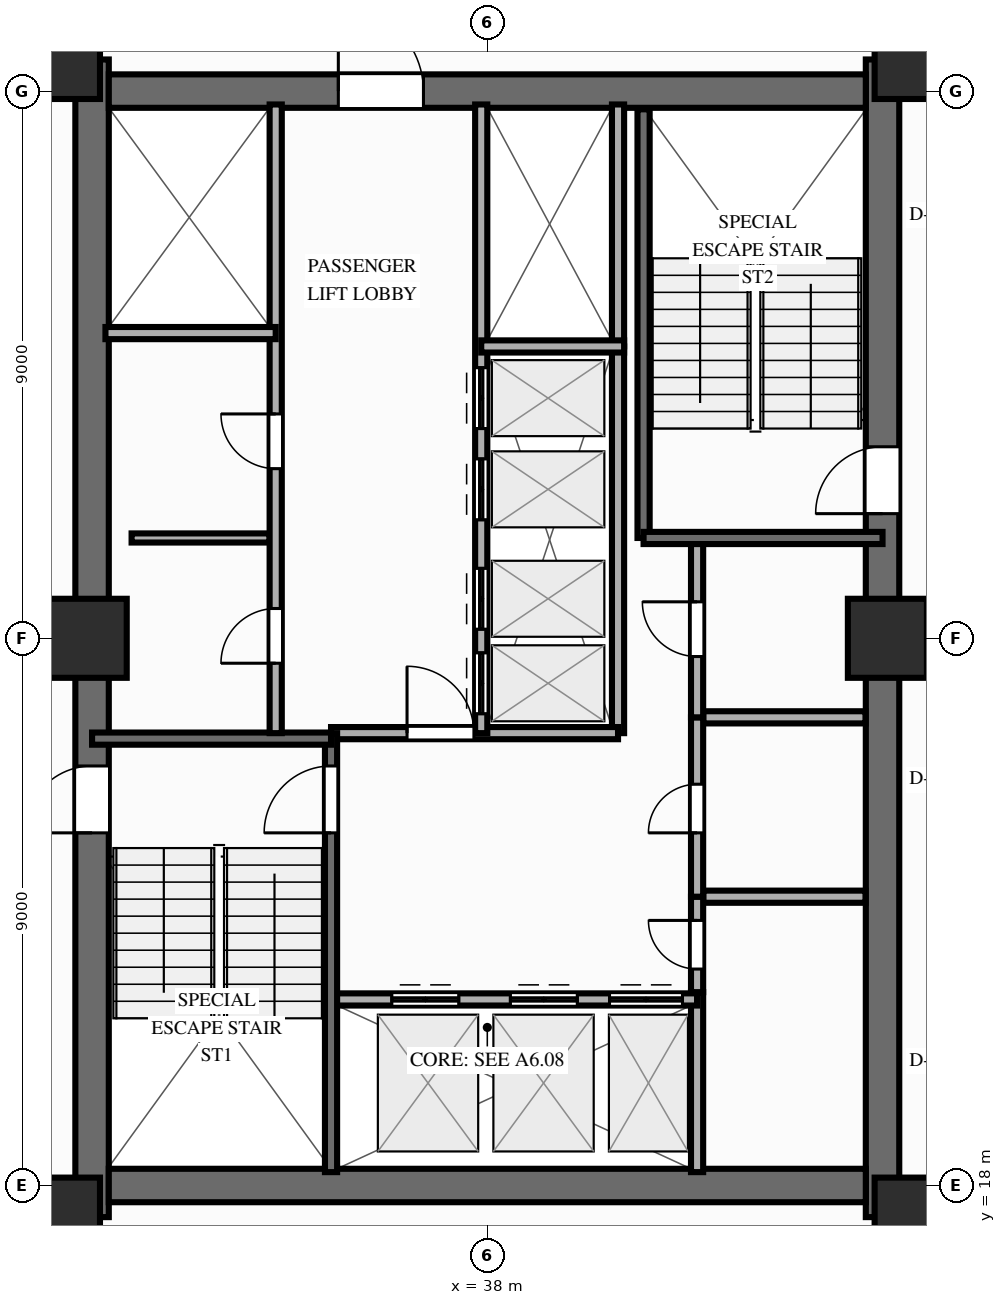
"""IFC4 building model, lengths in metres.
Left out: names, types, materials, properties, quantities, classifications, styles, units other than length and angle.
Written with IfcOpenShell. Run it as: python <this file> out.ifc"""

import sys

from ifc_helpers import new_model, si_unit, direction, frame, frame_2d, origin, origin_2d, place, context, subcontext, project, spatial, rectangle, extrude, source, transform, mapped, element, fill, save


model = new_model("IFC4")
c1 = context("Model", 3, precision=1e-05, world=origin(), true_north=direction((0.0, 1.0)))
c2 = subcontext(c1, "Body", "Model", "MODEL_VIEW")
j1 = project(units=[si_unit("LENGTHUNIT", "METRE"), si_unit("PLANEANGLEUNIT", "RADIAN")], contexts=[c1])
p1 = place(None, origin())
s1 = spatial("IfcSite", under=j1, at=p1, CompositionType="ELEMENT")
p2 = place(p1, origin())
s2 = spatial("IfcBuilding", under=s1, at=p2, CompositionType="ELEMENT")
p3 = place(p2, frame((0.0, 0.0, 122.85)))
s3 = spatial("IfcBuildingStorey", under=s2, at=p3, CompositionType="ELEMENT", Elevation=122.85)
p4 = place(p3, frame((31.5, 17.48, 0.0), z_axis=(0.0, 0.0, 1.0), x_axis=(0.0, 1.0, 0.0)))
e1 = element("IfcWall", 1, at=p4, inside=s3, PredefinedType="SHEAR", context=c2, shape_type="SweptSolid", body=[
    extrude(rectangle(XDim=19.04, YDim=0.55, at=frame_2d((9.52, 0.0))), origin(), (0.0, 0.0, 1.0), 3.9),
])
p5 = place(p4, frame((6.32, 0.0, 0.0)))
e2 = element("IfcOpeningElement", 2, at=p5, cuts=e1, PredefinedType="OPENING", context=c2, shape_type="SweptSolid", body=[
    extrude(rectangle(XDim=1.1, YDim=2.15, at=frame_2d((0.55, 1.075))), frame((0.0, 0.287, 0.0), z_axis=(0.0, -1.0, 0.0), x_axis=(1.0, 0.0, 0.0)), (0.0, 0.0, 1.0), 0.574),
])
p6 = place(p3, frame((44.5, 17.48, 0.0), z_axis=(0.0, 0.0, 1.0), x_axis=(0.0, 1.0, 0.0)))
e3 = element("IfcWall", 3, at=p6, inside=s3, PredefinedType="SHEAR", context=c2, shape_type="SweptSolid", body=[
    extrude(rectangle(XDim=19.04, YDim=0.55, at=frame_2d((9.52, 0.0))), origin(), (0.0, 0.0, 1.0), 3.9),
])
p7 = place(p6, frame((12.67, 0.0, 0.0), z_axis=(0.0, 0.0, 1.0), x_axis=(-1.0, 0.0, 0.0)))
e4 = element("IfcOpeningElement", 4, at=p7, cuts=e3, PredefinedType="OPENING", context=c2, shape_type="SweptSolid", body=[
    extrude(rectangle(XDim=1.1, YDim=2.15, at=frame_2d((0.55, 1.075))), frame((0.0, 0.287, 0.0), z_axis=(0.0, -1.0, 0.0), x_axis=(1.0, 0.0, 0.0)), (0.0, 0.0, 1.0), 0.574),
])
p8 = place(p3, frame((31.775, 18.0, 0.0), z_axis=(0.0, 0.0, 1.0), x_axis=(1.0, 0.0, 0.0)))
e5 = element("IfcWall", 5, at=p8, inside=s3, PredefinedType="SHEAR", context=c2, shape_type="SweptSolid", body=[
    extrude(rectangle(XDim=12.45, YDim=0.55, at=frame_2d((6.225, 0.0))), origin(), (0.0, 0.0, 1.0), 3.9),
])
p9 = place(p3, frame((31.775, 36.0, 0.0), z_axis=(0.0, 0.0, 1.0), x_axis=(1.0, 0.0, 0.0)))
e6 = element("IfcWall", 6, at=p9, inside=s3, PredefinedType="SHEAR", context=c2, shape_type="SweptSolid", body=[
    extrude(rectangle(XDim=12.45, YDim=0.55, at=frame_2d((6.225, 0.0))), origin(), (0.0, 0.0, 1.0), 3.9),
])
p10 = place(p9, frame((5.175, 0.0, 0.0), z_axis=(0.0, 0.0, 1.0), x_axis=(-1.0, 0.0, 0.0)))
e7 = element("IfcOpeningElement", 7, at=p10, cuts=e6, PredefinedType="OPENING", context=c2, shape_type="SweptSolid", body=[
    extrude(rectangle(XDim=1.4, YDim=2.15, at=frame_2d((0.7, 1.075))), frame((0.0, 0.287, 0.0), z_axis=(0.0, -1.0, 0.0), x_axis=(1.0, 0.0, 0.0)), (0.0, 0.0, 1.0), 0.574),
])
m1 = source(origin(), c2, "Body", "SweptSolid", [
    extrude(rectangle(XDim=1.3, YDim=1.3, at=origin_2d()), origin(), (0.0, 0.0, 1.0), 3.9),
])
for number, where, z_axis, x_axis in (
    (8, (30.98, 17.48, 0.0), (0.0, 0.0, 1.0), (1.0, 0.0, 0.0)),
    (9, (45.02, 17.48, 0.0), (0.0, 0.0, 1.0), (1.0, 0.0, 0.0)),
    (10, (30.98, 36.52, 0.0), (0.0, 0.0, 1.0), (1.0, 0.0, 0.0)),
    (11, (45.02, 36.52, 0.0), (0.0, 0.0, 1.0), (1.0, 0.0, 0.0)),
    (12, (31.42, 27.0, 0.0), (0.0, 0.0, 1.0), (1.0, 0.0, 0.0)),
    (13, (44.58, 27.0, 0.0), (0.0, 0.0, 1.0), (1.0, 0.0, 0.0)),
):
    element("IfcColumn", number, at=place(p3, frame(where, z_axis=z_axis, x_axis=x_axis)), inside=s3, PredefinedType="COLUMN", context=c2, shape_type="MappedRepresentation", body=[
        mapped(m1, transform((0.0, 0.0, 0.0), scale=1.0)),
    ])
p11 = place(p3, frame((32.15, 28.65, 0.0), z_axis=(0.0, 0.0, 1.0), x_axis=(1.0, 0.0, 0.0)))
e14 = element("IfcWall", 14, at=p11, inside=s3, PredefinedType="PARTITIONING", context=c2, shape_type="SweptSolid", body=[
    extrude(rectangle(XDim=2.27, YDim=0.15, at=frame_2d((1.135, 0.0))), origin(), (0.0, 0.0, 1.0), 3.04),
])
p12 = place(p3, frame((41.55, 22.75, 0.0), z_axis=(0.0, 0.0, 1.0), x_axis=(1.0, 0.0, 0.0)))
e15 = element("IfcWall", 15, at=p12, inside=s3, PredefinedType="PARTITIONING", context=c2, shape_type="SweptSolid", body=[
    extrude(rectangle(XDim=2.67, YDim=0.2, at=frame_2d((1.335, 0.0))), origin(), (0.0, 0.0, 1.0), 3.56),
])
p13 = place(p3, frame((41.55, 25.7, 0.0), z_axis=(0.0, 0.0, 1.0), x_axis=(1.0, 0.0, 0.0)))
e16 = element("IfcWall", 16, at=p13, inside=s3, PredefinedType="PARTITIONING", context=c2, shape_type="SweptSolid", body=[
    extrude(rectangle(XDim=2.67, YDim=0.2, at=frame_2d((1.335, 0.0))), origin(), (0.0, 0.0, 1.0), 3.04),
])
p14 = place(p3, frame((41.45, 18.22, 0.0), z_axis=(0.0, 0.0, 1.0), x_axis=(0.0, 1.0, 0.0)))
e17 = element("IfcWall", 17, at=p14, inside=s3, PredefinedType="PARTITIONING", context=c2, shape_type="SweptSolid", body=[
    extrude(rectangle(XDim=2.96, YDim=0.2, at=frame_2d((1.48, 0.0))), origin(), (0.0, 0.0, 1.0), 3.56),
])
p15 = place(p3, frame((41.45, 21.18, 0.0), z_axis=(0.0, 0.0, 1.0), x_axis=(0.0, 1.0, 0.0)))
e18 = element("IfcWall", 18, at=p15, inside=s3, PredefinedType="PARTITIONING", context=c2, shape_type="SweptSolid", body=[
    extrude(rectangle(XDim=1.57, YDim=0.2, at=frame_2d((0.785, 0.0))), origin(), (0.0, 0.0, 1.0), 3.56),
])
p16 = place(p15, frame((0.38, 0.0, 0.0)))
e19 = element("IfcOpeningElement", 19, at=p16, cuts=e18, PredefinedType="OPENING", context=c2, shape_type="SweptSolid", body=[
    extrude(rectangle(XDim=0.8, YDim=2.05, at=frame_2d((0.4, 1.025))), frame((0.0, 0.112, 0.0), z_axis=(0.0, -1.0, 0.0), x_axis=(1.0, 0.0, 0.0)), (0.0, 0.0, 1.0), 0.224),
])
p17 = place(p3, frame((41.45, 22.75, 0.0), z_axis=(0.0, 0.0, 1.0), x_axis=(0.0, 1.0, 0.0)))
e20 = element("IfcWall", 20, at=p17, inside=s3, PredefinedType="PARTITIONING", context=c2, shape_type="SweptSolid", body=[
    extrude(rectangle(XDim=2.95, YDim=0.2, at=frame_2d((1.475, 0.0))), origin(), (0.0, 0.0, 1.0), 3.56),
])
p18 = place(p17, frame((1.05, 0.0, 0.0)))
e21 = element("IfcOpeningElement", 21, at=p18, cuts=e20, PredefinedType="OPENING", context=c2, shape_type="SweptSolid", body=[
    extrude(rectangle(XDim=0.8, YDim=2.05, at=frame_2d((0.4, 1.025))), frame((0.0, 0.112, 0.0), z_axis=(0.0, -1.0, 0.0), x_axis=(1.0, 0.0, 0.0)), (0.0, 0.0, 1.0), 0.224),
])
p19 = place(p3, frame((41.45, 25.7, 0.0), z_axis=(0.0, 0.0, 1.0), x_axis=(0.0, 1.0, 0.0)))
e22 = element("IfcWall", 22, at=p19, inside=s3, PredefinedType="PARTITIONING", context=c2, shape_type="SweptSolid", body=[
    extrude(rectangle(XDim=2.9, YDim=0.2, at=frame_2d((1.45, 0.0))), origin(), (0.0, 0.0, 1.0), 3.56),
])
p20 = place(p19, frame((1.0, 0.0, 0.0)))
e23 = element("IfcOpeningElement", 23, at=p20, cuts=e22, PredefinedType="OPENING", context=c2, shape_type="SweptSolid", body=[
    extrude(rectangle(XDim=0.9, YDim=2.1, at=frame_2d((0.45, 1.05))), frame((0.0, 0.112, 0.0), z_axis=(0.0, -1.0, 0.0), x_axis=(1.0, 0.0, 0.0)), (0.0, 0.0, 1.0), 0.224),
])
p21 = place(p3, frame((40.15, 25.44, 0.0), z_axis=(0.0, 0.0, 1.0), x_axis=(0.0, 1.0, 0.0)))
e24 = element("IfcWall", 24, at=p21, inside=s3, PredefinedType="PARTITIONING", context=c2, shape_type="SweptSolid", body=[
    extrude(rectangle(XDim=6.36, YDim=0.2, at=frame_2d((3.18, 0.0))), origin(), (0.0, 0.0, 1.0), 3.56),
])
p22 = place(p3, frame((40.15, 31.8, 0.0), z_axis=(0.0, 0.0, 1.0), x_axis=(0.0, 1.0, 0.0)))
e25 = element("IfcWall", 25, at=p22, inside=s3, PredefinedType="PARTITIONING", context=c2, shape_type="SweptSolid", body=[
    extrude(rectangle(XDim=3.98, YDim=0.2, at=frame_2d((1.99, 0.0))), origin(), (0.0, 0.0, 1.0), 3.56),
])
p23 = place(p3, frame((35.43, 21.06, 0.0), z_axis=(0.0, 0.0, 1.0), x_axis=(1.0, 0.0, 0.0)))
e26 = element("IfcWall", 26, at=p23, inside=s3, PredefinedType="PARTITIONING", context=c2, shape_type="SweptSolid", body=[
    extrude(rectangle(XDim=6.02, YDim=0.2, at=frame_2d((3.01, 0.0))), origin(), (0.0, 0.0, 1.0), 3.56),
])
p24 = place(p23, frame((1.0, 0.0, 0.0)))
e27 = element("IfcOpeningElement", 27, at=p24, cuts=e26, PredefinedType="OPENING", context=c2, shape_type="SweptSolid", body=[
    extrude(rectangle(XDim=1.1, YDim=2.15, at=frame_2d((0.55, 1.075))), frame((0.0, 0.112, 0.0), z_axis=(0.0, -1.0, 0.0), x_axis=(1.0, 0.0, 0.0)), (0.0, 0.0, 1.0), 0.224),
])
p25 = place(p23, frame((2.95, 0.0, 0.0)))
e28 = element("IfcOpeningElement", 28, at=p25, cuts=e26, PredefinedType="OPENING", context=c2, shape_type="SweptSolid", body=[
    extrude(rectangle(XDim=1.1, YDim=2.15, at=frame_2d((0.55, 1.075))), frame((0.0, 0.112, 0.0), z_axis=(0.0, -1.0, 0.0), x_axis=(1.0, 0.0, 0.0)), (0.0, 0.0, 1.0), 0.224),
])
p26 = place(p23, frame((4.58, 0.0, 0.0)))
e29 = element("IfcOpeningElement", 29, at=p26, cuts=e26, PredefinedType="OPENING", context=c2, shape_type="SweptSolid", body=[
    extrude(rectangle(XDim=1.2, YDim=2.15, at=frame_2d((0.6, 1.075))), frame((0.0, 0.112, 0.0), z_axis=(0.0, -1.0, 0.0), x_axis=(1.0, 0.0, 0.0)), (0.0, 0.0, 1.0), 0.224),
])
p27 = place(p3, frame((35.43, 25.44, 0.0), z_axis=(0.0, 0.0, 1.0), x_axis=(1.0, 0.0, 0.0)))
e30 = element("IfcWall", 30, at=p27, inside=s3, PredefinedType="PARTITIONING", context=c2, shape_type="SweptSolid", body=[
    extrude(rectangle(XDim=4.72, YDim=0.2, at=frame_2d((2.36, 0.0))), origin(), (0.0, 0.0, 1.0), 3.56),
])
p28 = place(p27, frame((1.25, 0.0, 0.0)))
e31 = element("IfcOpeningElement", 31, at=p28, cuts=e30, PredefinedType="OPENING", context=c2, shape_type="SweptSolid", body=[
    extrude(rectangle(XDim=1.1, YDim=2.15, at=frame_2d((0.55, 1.075))), frame((0.0, 0.112, 0.0), z_axis=(0.0, -1.0, 0.0), x_axis=(1.0, 0.0, 0.0)), (0.0, 0.0, 1.0), 0.224),
])
p29 = place(p3, frame((35.43, 18.22, 0.0), z_axis=(0.0, 0.0, 1.0), x_axis=(0.0, 1.0, 0.0)))
e32 = element("IfcWall", 32, at=p29, inside=s3, PredefinedType="SOLIDWALL", context=c2, shape_type="SweptSolid", body=[
    extrude(rectangle(XDim=7.22, YDim=0.2, at=frame_2d((3.61, 0.0))), origin(), (0.0, 0.0, 1.0), 3.69),
])
p30 = place(p29, frame((6.68, 0.0, 0.0), z_axis=(0.0, 0.0, 1.0), x_axis=(-1.0, 0.0, 0.0)))
e33 = element("IfcOpeningElement", 33, at=p30, cuts=e32, PredefinedType="OPENING", context=c2, shape_type="SweptSolid", body=[
    extrude(rectangle(XDim=1.1, YDim=2.15, at=frame_2d((0.55, 1.075))), frame((0.0, 0.112, 0.0), z_axis=(0.0, -1.0, 0.0), x_axis=(1.0, 0.0, 0.0)), (0.0, 0.0, 1.0), 0.224),
])
p31 = place(p3, frame((31.5, 25.35, 0.0), z_axis=(0.0, 0.0, 1.0), x_axis=(1.0, 0.0, 0.0)))
e34 = element("IfcWall", 34, at=p31, inside=s3, PredefinedType="SOLIDWALL", context=c2, shape_type="SweptSolid", body=[
    extrude(rectangle(XDim=3.93, YDim=0.2, at=frame_2d((1.965, 0.0))), origin(), (0.0, 0.0, 1.0), 3.69),
])
p32 = place(p3, frame((40.57, 28.65, 0.0), z_axis=(0.0, 0.0, 1.0), x_axis=(0.0, 1.0, 0.0)))
e35 = element("IfcWall", 35, at=p32, inside=s3, PredefinedType="SOLIDWALL", context=c2, shape_type="SweptSolid", body=[
    extrude(rectangle(XDim=7.05, YDim=0.2, at=frame_2d((3.525, 0.0))), origin(), (0.0, 0.0, 1.0), 3.69),
])
p33 = place(p3, frame((40.57, 28.65, 0.0), z_axis=(0.0, 0.0, 1.0), x_axis=(1.0, 0.0, 0.0)))
e36 = element("IfcWall", 36, at=p33, inside=s3, PredefinedType="SOLIDWALL", context=c2, shape_type="SweptSolid", body=[
    extrude(rectangle(XDim=3.93, YDim=0.2, at=frame_2d((1.965, 0.0))), origin(), (0.0, 0.0, 1.0), 3.69),
])
p34 = place(p3, frame((34.52, 25.44, 0.0), z_axis=(0.0, 0.0, 1.0), x_axis=(0.0, 1.0, 0.0)))
e37 = element("IfcWall", 37, at=p34, inside=s3, PredefinedType="PARTITIONING", context=c2, shape_type="SweptSolid", body=[
    extrude(rectangle(XDim=10.34, YDim=0.2, at=frame_2d((5.17, 0.0))), origin(), (0.0, 0.0, 1.0), 3.56),
])
p35 = place(p34, frame((1.15, 0.0, 0.0)))
e38 = element("IfcOpeningElement", 38, at=p35, cuts=e37, PredefinedType="OPENING", context=c2, shape_type="SweptSolid", body=[
    extrude(rectangle(XDim=0.9, YDim=2.1, at=frame_2d((0.45, 1.05))), frame((0.0, 0.112, 0.0), z_axis=(0.0, -1.0, 0.0), x_axis=(1.0, 0.0, 0.0)), (0.0, 0.0, 1.0), 0.224),
])
p36 = place(p34, frame((4.35, 0.0, 0.0)))
e39 = element("IfcOpeningElement", 39, at=p36, cuts=e37, PredefinedType="OPENING", context=c2, shape_type="SweptSolid", body=[
    extrude(rectangle(XDim=0.9, YDim=2.1, at=frame_2d((0.45, 1.05))), frame((0.0, 0.112, 0.0), z_axis=(0.0, -1.0, 0.0), x_axis=(1.0, 0.0, 0.0)), (0.0, 0.0, 1.0), 0.224),
])
p37 = place(p3, frame((31.72, 32.02, 0.0), z_axis=(0.0, 0.0, 1.0), x_axis=(1.0, 0.0, 0.0)))
e40 = element("IfcWall", 40, at=p37, inside=s3, PredefinedType="PARTITIONING", context=c2, shape_type="SweptSolid", body=[
    extrude(rectangle(XDim=2.8, YDim=0.2, at=frame_2d((1.4, 0.0))), origin(), (0.0, 0.0, 1.0), 3.56),
])
p38 = place(p3, frame((37.9, 25.44, 0.0), z_axis=(0.0, 0.0, 1.0), x_axis=(0.0, 1.0, 0.0)))
e41 = element("IfcWall", 41, at=p38, inside=s3, PredefinedType="PARTITIONING", context=c2, shape_type="SweptSolid", body=[
    extrude(rectangle(XDim=10.34, YDim=0.2, at=frame_2d((5.17, 0.0))), origin(), (0.0, 0.0, 1.0), 3.56),
])
p39 = place(p38, frame((0.32, 0.0, 0.0)))
e42 = element("IfcOpeningElement", 42, at=p39, cuts=e41, PredefinedType="OPENING", context=c2, shape_type="SweptSolid", body=[
    extrude(rectangle(XDim=1.0, YDim=2.15, at=frame_2d((0.5, 1.075))), frame((0.0, 0.112, 0.0), z_axis=(0.0, -1.0, 0.0), x_axis=(1.0, 0.0, 0.0)), (0.0, 0.0, 1.0), 0.224),
])
p40 = place(p38, frame((1.71, 0.0, 0.0)))
e43 = element("IfcOpeningElement", 43, at=p40, cuts=e41, PredefinedType="OPENING", context=c2, shape_type="SweptSolid", body=[
    extrude(rectangle(XDim=1.0, YDim=2.15, at=frame_2d((0.5, 1.075))), frame((0.0, 0.112, 0.0), z_axis=(0.0, -1.0, 0.0), x_axis=(1.0, 0.0, 0.0)), (0.0, 0.0, 1.0), 0.224),
])
p41 = place(p38, frame((3.51, 0.0, 0.0)))
e44 = element("IfcOpeningElement", 44, at=p41, cuts=e41, PredefinedType="OPENING", context=c2, shape_type="SweptSolid", body=[
    extrude(rectangle(XDim=1.0, YDim=2.15, at=frame_2d((0.5, 1.075))), frame((0.0, 0.112, 0.0), z_axis=(0.0, -1.0, 0.0), x_axis=(1.0, 0.0, 0.0)), (0.0, 0.0, 1.0), 0.224),
])
p42 = place(p38, frame((5.01, 0.0, 0.0)))
e45 = element("IfcOpeningElement", 45, at=p42, cuts=e41, PredefinedType="OPENING", context=c2, shape_type="SweptSolid", body=[
    extrude(rectangle(XDim=1.0, YDim=2.15, at=frame_2d((0.5, 1.075))), frame((0.0, 0.112, 0.0), z_axis=(0.0, -1.0, 0.0), x_axis=(1.0, 0.0, 0.0)), (0.0, 0.0, 1.0), 0.224),
])
p43 = place(p3, frame((37.9, 31.8, 0.0), z_axis=(0.0, 0.0, 1.0), x_axis=(1.0, 0.0, 0.0)))
e46 = element("IfcWall", 46, at=p43, inside=s3, PredefinedType="PARTITIONING", context=c2, shape_type="SweptSolid", body=[
    extrude(rectangle(XDim=2.35, YDim=0.2, at=frame_2d((1.175, 0.0))), origin(), (0.0, 0.0, 1.0), 3.56),
])
m2 = source(origin(), c2, "Body", "SweptSolid", [
    extrude(rectangle(XDim=1.1, YDim=2.15, at=frame_2d((0.55, 1.075))), frame((0.0, 0.025, 0.0), z_axis=(0.0, -1.0, 0.0), x_axis=(1.0, 0.0, 0.0)), (0.0, 0.0, 1.0), 0.05),
])
p44 = place(p5, origin())
e47 = element("IfcDoor", 47, at=p44, inside=s3, OperationType="SINGLE_SWING_LEFT", PredefinedType="DOOR", context=c2, shape_type="MappedRepresentation", body=[
    mapped(m2, transform((0.0, 0.0, 0.0), scale=1.0)),
])
fill(e2, e47)
p45 = place(p7, origin())
e48 = element("IfcDoor", 48, at=p45, inside=s3, OperationType="SINGLE_SWING_RIGHT", PredefinedType="DOOR", context=c2, shape_type="MappedRepresentation", body=[
    mapped(m2, transform((0.0, 0.0, 0.0), scale=1.0)),
])
fill(e4, e48)
m3 = source(origin(), c2, "Body", "SweptSolid", [
    extrude(rectangle(XDim=1.4, YDim=2.15, at=frame_2d((0.7, 1.075))), frame((0.0, 0.025, 0.0), z_axis=(0.0, -1.0, 0.0), x_axis=(1.0, 0.0, 0.0)), (0.0, 0.0, 1.0), 0.05),
])
p46 = place(p10, origin())
e49 = element("IfcDoor", 49, at=p46, inside=s3, OperationType="SINGLE_SWING_RIGHT", PredefinedType="DOOR", context=c2, shape_type="MappedRepresentation", body=[
    mapped(m3, transform((0.0, 0.0, 0.0), scale=1.0)),
])
fill(e7, e49)
m4 = source(origin(), c2, "Body", "SweptSolid", [
    extrude(rectangle(XDim=0.8, YDim=2.05, at=frame_2d((0.4, 1.025))), frame((0.0, 0.025, 0.0), z_axis=(0.0, -1.0, 0.0), x_axis=(1.0, 0.0, 0.0)), (0.0, 0.0, 1.0), 0.05),
])
p47 = place(p16, origin())
e50 = element("IfcDoor", 50, at=p47, inside=s3, OperationType="SINGLE_SWING_RIGHT", PredefinedType="DOOR", context=c2, shape_type="MappedRepresentation", body=[
    mapped(m4, transform((0.0, 0.0, 0.0), scale=1.0)),
])
fill(e19, e50)
p48 = place(p18, origin())
e51 = element("IfcDoor", 51, at=p48, inside=s3, OperationType="SINGLE_SWING_LEFT", PredefinedType="DOOR", context=c2, shape_type="MappedRepresentation", body=[
    mapped(m4, transform((0.0, 0.0, 0.0), scale=1.0)),
])
fill(e21, e51)
m5 = source(origin(), c2, "Body", "SweptSolid", [
    extrude(rectangle(XDim=0.9, YDim=2.1, at=frame_2d((0.45, 1.05))), frame((0.0, 0.025, 0.0), z_axis=(0.0, -1.0, 0.0), x_axis=(1.0, 0.0, 0.0)), (0.0, 0.0, 1.0), 0.05),
])
p49 = place(p20, origin())
e52 = element("IfcDoor", 52, at=p49, inside=s3, OperationType="SINGLE_SWING_RIGHT", PredefinedType="DOOR", context=c2, shape_type="MappedRepresentation", body=[
    mapped(m5, transform((0.0, 0.0, 0.0), scale=1.0)),
])
fill(e23, e52)
p50 = place(p24, origin())
e53 = element("IfcDoor", 53, at=p50, inside=s3, OperationType="DOUBLE_DOOR_SLIDING", PredefinedType="DOOR", context=c2, shape_type="MappedRepresentation", body=[
    mapped(m2, transform((0.0, 0.0, 0.0), scale=1.0)),
])
fill(e27, e53)
p51 = place(p25, origin())
e54 = element("IfcDoor", 54, at=p51, inside=s3, OperationType="DOUBLE_DOOR_SLIDING", PredefinedType="DOOR", context=c2, shape_type="MappedRepresentation", body=[
    mapped(m2, transform((0.0, 0.0, 0.0), scale=1.0)),
])
fill(e28, e54)
m6 = source(origin(), c2, "Body", "SweptSolid", [
    extrude(rectangle(XDim=1.2, YDim=2.15, at=frame_2d((0.6, 1.075))), frame((0.0, 0.025, 0.0), z_axis=(0.0, -1.0, 0.0), x_axis=(1.0, 0.0, 0.0)), (0.0, 0.0, 1.0), 0.05),
])
p52 = place(p26, origin())
e55 = element("IfcDoor", 55, at=p52, inside=s3, OperationType="DOUBLE_DOOR_SLIDING", PredefinedType="DOOR", context=c2, shape_type="MappedRepresentation", body=[
    mapped(m6, transform((0.0, 0.0, 0.0), scale=1.0)),
])
fill(e29, e55)
p53 = place(p28, origin())
e56 = element("IfcDoor", 56, at=p53, inside=s3, OperationType="SINGLE_SWING_LEFT", PredefinedType="DOOR", context=c2, shape_type="MappedRepresentation", body=[
    mapped(m2, transform((0.0, 0.0, 0.0), scale=1.0)),
])
fill(e31, e56)
p54 = place(p30, origin())
e57 = element("IfcDoor", 57, at=p54, inside=s3, OperationType="SINGLE_SWING_RIGHT", PredefinedType="DOOR", context=c2, shape_type="MappedRepresentation", body=[
    mapped(m2, transform((0.0, 0.0, 0.0), scale=1.0)),
])
fill(e33, e57)
p55 = place(p35, origin())
e58 = element("IfcDoor", 58, at=p55, inside=s3, OperationType="SINGLE_SWING_LEFT", PredefinedType="DOOR", context=c2, shape_type="MappedRepresentation", body=[
    mapped(m5, transform((0.0, 0.0, 0.0), scale=1.0)),
])
fill(e38, e58)
p56 = place(p36, origin())
e59 = element("IfcDoor", 59, at=p56, inside=s3, OperationType="SINGLE_SWING_RIGHT", PredefinedType="DOOR", context=c2, shape_type="MappedRepresentation", body=[
    mapped(m5, transform((0.0, 0.0, 0.0), scale=1.0)),
])
fill(e39, e59)
m7 = source(origin(), c2, "Body", "SweptSolid", [
    extrude(rectangle(XDim=1.0, YDim=2.15, at=frame_2d((0.5, 1.075))), frame((0.0, 0.025, 0.0), z_axis=(0.0, -1.0, 0.0), x_axis=(1.0, 0.0, 0.0)), (0.0, 0.0, 1.0), 0.05),
])
p57 = place(p39, origin())
e60 = element("IfcDoor", 60, at=p57, inside=s3, OperationType="DOUBLE_DOOR_SLIDING", PredefinedType="DOOR", context=c2, shape_type="MappedRepresentation", body=[
    mapped(m7, transform((0.0, 0.0, 0.0), scale=1.0)),
])
fill(e42, e60)
p58 = place(p40, origin())
e61 = element("IfcDoor", 61, at=p58, inside=s3, OperationType="DOUBLE_DOOR_SLIDING", PredefinedType="DOOR", context=c2, shape_type="MappedRepresentation", body=[
    mapped(m7, transform((0.0, 0.0, 0.0), scale=1.0)),
])
fill(e43, e61)
p59 = place(p41, origin())
e62 = element("IfcDoor", 62, at=p59, inside=s3, OperationType="DOUBLE_DOOR_SLIDING", PredefinedType="DOOR", context=c2, shape_type="MappedRepresentation", body=[
    mapped(m7, transform((0.0, 0.0, 0.0), scale=1.0)),
])
fill(e44, e62)
p60 = place(p42, origin())
e63 = element("IfcDoor", 63, at=p60, inside=s3, OperationType="DOUBLE_DOOR_SLIDING", PredefinedType="DOOR", context=c2, shape_type="MappedRepresentation", body=[
    mapped(m7, transform((0.0, 0.0, 0.0), scale=1.0)),
])
fill(e45, e63)
save(model, sys.argv[1])
